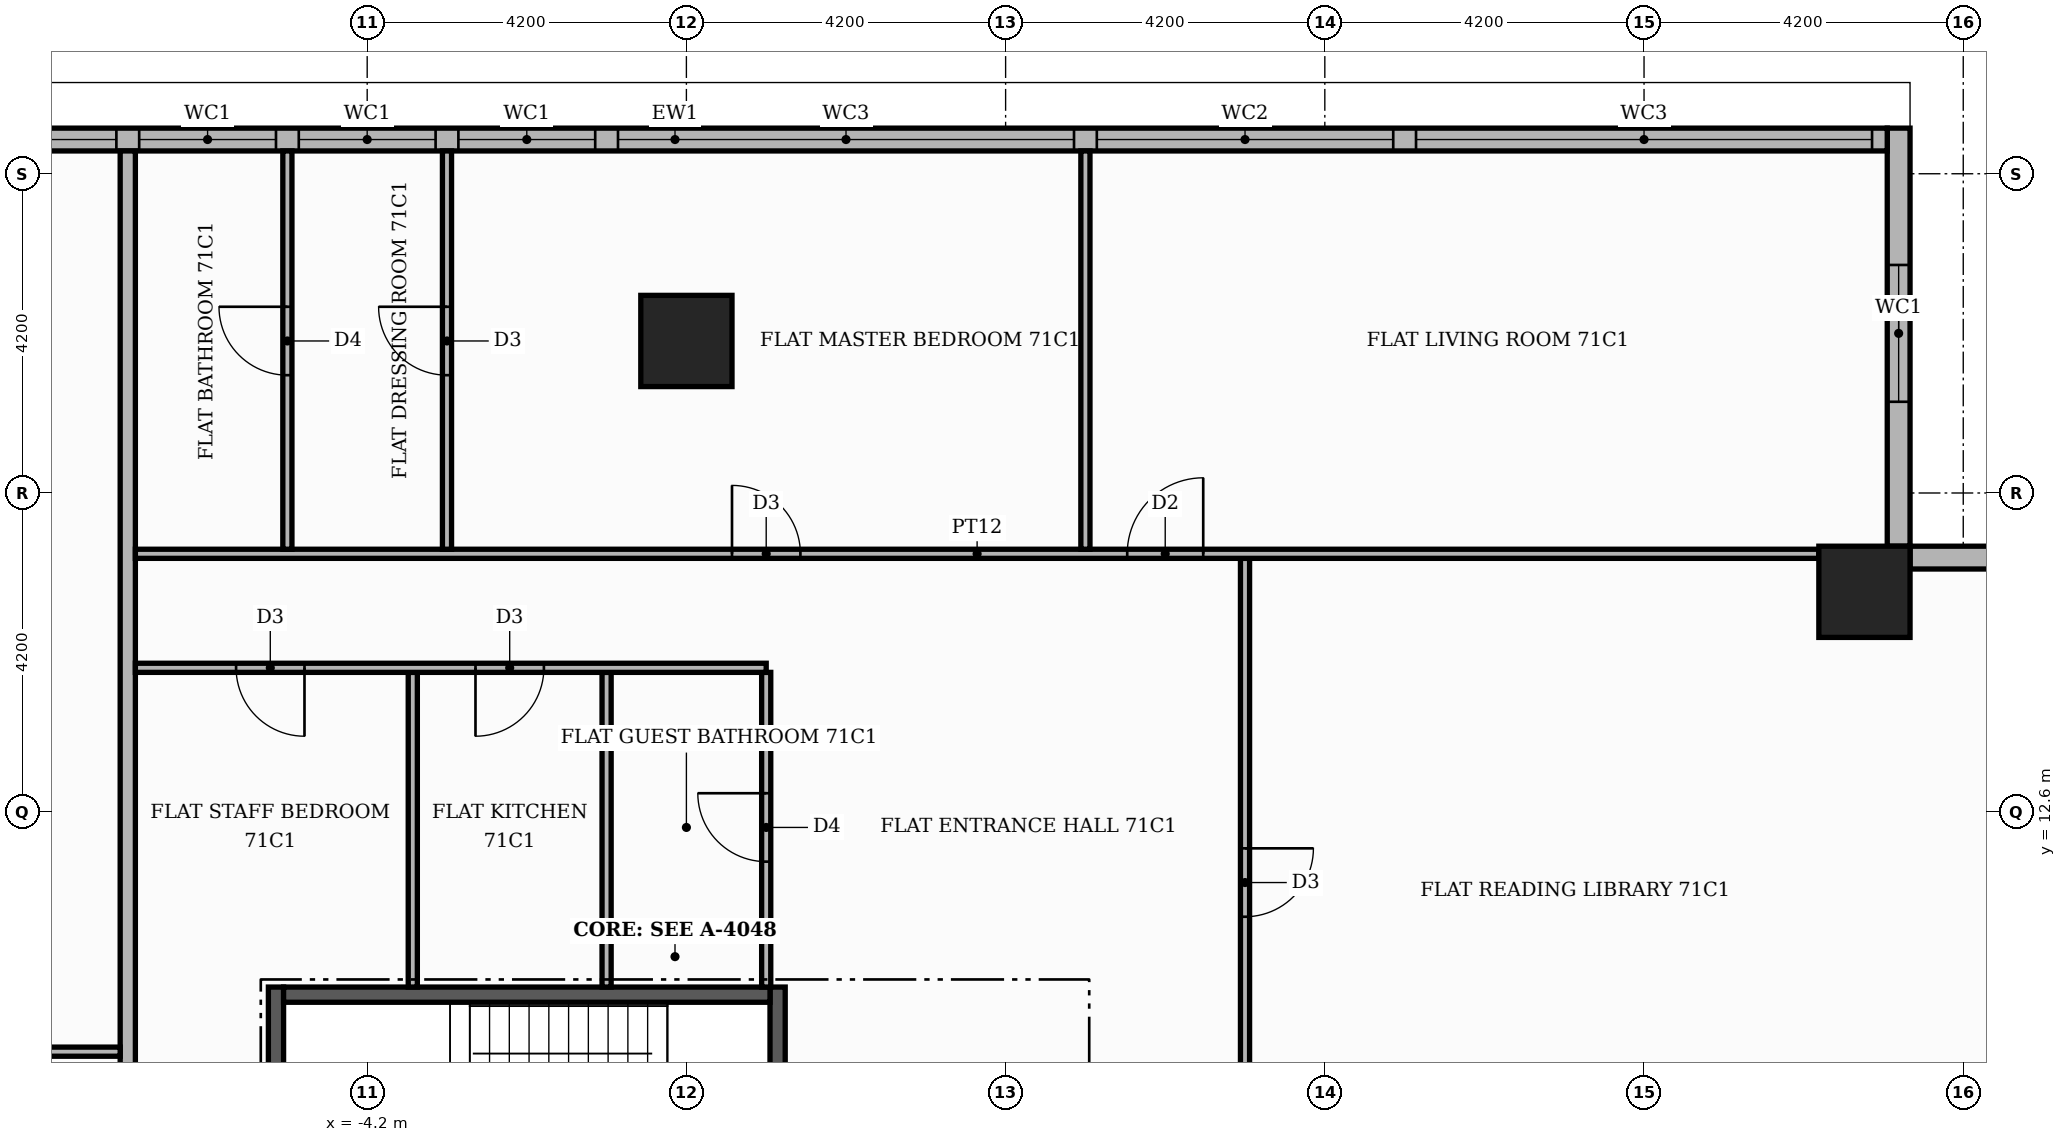
"""IFC4 building model, lengths in metres.
Left out: names, types, materials, properties, quantities, classifications, styles, units other than length and angle.
Written with IfcOpenShell. Run it as: python <this file> out.ifc"""

import sys

from ifc_helpers import new_model, si_unit, direction, frame, frame_2d, origin, origin_2d, place, context, subcontext, project, spatial, rectangle, extrude, element, fill, save


model = new_model("IFC4")
c1 = context("Model", 3, precision=1e-05, world=origin(), true_north=direction((0.0, 1.0)))
c2 = subcontext(c1, "Body", "Model", "MODEL_VIEW")
j1 = project(units=[si_unit("LENGTHUNIT", "METRE"), si_unit("PLANEANGLEUNIT", "RADIAN")], contexts=[c1])
p1 = place(None, origin())
s1 = spatial("IfcSite", under=j1, at=p1, CompositionType="ELEMENT")
p2 = place(p1, origin())
s2 = spatial("IfcBuilding", under=s1, at=p2, CompositionType="ELEMENT")
p3 = place(p2, frame((0.0, 0.0, 296.7)))
s3 = spatial("IfcBuildingStorey", under=s2, at=p3, CompositionType="ELEMENT", Elevation=296.7)
for number, where, z_axis, x_axis in (
    (1, (-5.4, 7.05, 0.0), (0.0, 0.0, 1.0), (0.0, 1.0, 0.0)),
    (2, (1.2, 7.05, 0.0), (0.0, 0.0, 1.0), (0.0, 1.0, 0.0)),
):
    element("IfcWall", number, at=place(p3, frame(where, z_axis=z_axis, x_axis=x_axis)), inside=s3, PredefinedType="SHEAR", context=c2, shape_type="SweptSolid", body=[
        extrude(rectangle(XDim=3.25, YDim=0.2, at=frame_2d((1.625, 0.0))), origin(), (0.0, 0.0, 1.0), 3.55),
    ])
p4 = place(p3, frame((-5.3, 10.2, 0.0), z_axis=(0.0, 0.0, 1.0), x_axis=(1.0, 0.0, 0.0)))
e3 = element("IfcWall", 3, at=p4, inside=s3, PredefinedType="SHEAR", context=c2, shape_type="SweptSolid", body=[
    extrude(rectangle(XDim=6.4, YDim=0.2, at=frame_2d((3.2, 0.0))), origin(), (0.0, 0.0, 1.0), 3.55),
])
for number, where, z_axis, x_axis in (
    (4, (15.5, 15.5, 0.0), (0.0, 0.0, 1.0), (1.0, 0.0, 0.0)),
    (5, (0.0, 18.8, 0.0), (0.0, 0.0, 1.0), (1.0, 0.0, 0.0)),
):
    element("IfcColumn", number, at=place(p3, frame(where, z_axis=z_axis, x_axis=x_axis)), inside=s3, PredefinedType="COLUMN", context=c2, shape_type="SweptSolid", body=[
        extrude(rectangle(XDim=1.2, YDim=1.2, at=origin_2d()), origin(), (0.0, 0.0, 1.0), 3.9),
    ])
p5 = place(p3, frame((21.3, 15.95, 0.0), z_axis=(0.0, 0.0, 1.0), x_axis=(-1.0, 0.0, 0.0)))
e6 = element("IfcWall", 6, at=p5, inside=s3, PredefinedType="STANDARD", context=c2, shape_type="SweptSolid", body=[
    extrude(rectangle(XDim=5.2, YDim=0.3, at=frame_2d((2.6, 0.0))), origin(), (0.0, 0.0, 1.0), 3.55),
])
p6 = place(p5, frame((1.5, 0.0, 0.6)))
e7 = element("IfcOpeningElement", 7, at=p6, cuts=e6, PredefinedType="OPENING", context=c2, shape_type="SweptSolid", body=[
    extrude(rectangle(XDim=1.8, YDim=2.4, at=frame_2d((0.9, 1.2))), frame((0.0, 0.16, 0.0), z_axis=(0.0, -1.0, 0.0), x_axis=(1.0, 0.0, 0.0)), (0.0, 0.0, 1.0), 0.32),
])
p7 = place(p3, frame((15.95, 16.1, 0.0), z_axis=(0.0, 0.0, 1.0), x_axis=(0.0, 1.0, 0.0)))
e8 = element("IfcWall", 8, at=p7, inside=s3, PredefinedType="STANDARD", context=c2, shape_type="SweptSolid", body=[
    extrude(rectangle(XDim=5.5, YDim=0.3, at=frame_2d((2.75, 0.0))), origin(), (0.0, 0.0, 1.0), 3.55),
])
p8 = place(p7, frame((1.9, 0.0, 0.6)))
e9 = element("IfcOpeningElement", 9, at=p8, cuts=e8, PredefinedType="OPENING", context=c2, shape_type="SweptSolid", body=[
    extrude(rectangle(XDim=1.8, YDim=2.4, at=frame_2d((0.9, 1.2))), frame((0.0, 0.16, 0.0), z_axis=(0.0, -1.0, 0.0), x_axis=(1.0, 0.0, 0.0)), (0.0, 0.0, 1.0), 0.32),
])
p9 = place(p3, frame((15.8, 21.45, 0.0), z_axis=(0.0, 0.0, 1.0), x_axis=(-1.0, 0.0, 0.0)))
e10 = element("IfcWall", 10, at=p9, inside=s3, PredefinedType="STANDARD", context=c2, shape_type="SweptSolid", body=[
    extrude(rectangle(XDim=31.9, YDim=0.3, at=frame_2d((15.95, 0.0))), origin(), (0.0, 0.0, 1.0), 3.55),
])
p10 = place(p9, frame((0.2, 0.0, 0.6)))
e11 = element("IfcOpeningElement", 11, at=p10, cuts=e10, PredefinedType="OPENING", context=c2, shape_type="SweptSolid", body=[
    extrude(rectangle(XDim=6.0, YDim=2.4, at=frame_2d((3.0, 1.2))), frame((0.0, 0.16, 0.0), z_axis=(0.0, -1.0, 0.0), x_axis=(1.0, 0.0, 0.0)), (0.0, 0.0, 1.0), 0.32),
])
p11 = place(p9, frame((6.5, 0.0, 0.6)))
e12 = element("IfcOpeningElement", 12, at=p11, cuts=e10, PredefinedType="OPENING", context=c2, shape_type="SweptSolid", body=[
    extrude(rectangle(XDim=3.9, YDim=2.4, at=frame_2d((1.95, 1.2))), frame((0.0, 0.16, 0.0), z_axis=(0.0, -1.0, 0.0), x_axis=(1.0, 0.0, 0.0)), (0.0, 0.0, 1.0), 0.32),
])
p12 = place(p9, frame((10.7, 0.0, 0.6)))
e13 = element("IfcOpeningElement", 13, at=p12, cuts=e10, PredefinedType="OPENING", context=c2, shape_type="SweptSolid", body=[
    extrude(rectangle(XDim=6.0, YDim=2.4, at=frame_2d((3.0, 1.2))), frame((0.0, 0.16, 0.0), z_axis=(0.0, -1.0, 0.0), x_axis=(1.0, 0.0, 0.0)), (0.0, 0.0, 1.0), 0.32),
])
p13 = place(p9, frame((17.0, 0.0, 0.6)))
e14 = element("IfcOpeningElement", 14, at=p13, cuts=e10, PredefinedType="OPENING", context=c2, shape_type="SweptSolid", body=[
    extrude(rectangle(XDim=1.8, YDim=2.4, at=frame_2d((0.9, 1.2))), frame((0.0, 0.16, 0.0), z_axis=(0.0, -1.0, 0.0), x_axis=(1.0, 0.0, 0.0)), (0.0, 0.0, 1.0), 0.32),
])
p14 = place(p9, frame((19.1, 0.0, 0.6)))
e15 = element("IfcOpeningElement", 15, at=p14, cuts=e10, PredefinedType="OPENING", context=c2, shape_type="SweptSolid", body=[
    extrude(rectangle(XDim=1.8, YDim=2.4, at=frame_2d((0.9, 1.2))), frame((0.0, 0.16, 0.0), z_axis=(0.0, -1.0, 0.0), x_axis=(1.0, 0.0, 0.0)), (0.0, 0.0, 1.0), 0.32),
])
p15 = place(p9, frame((21.2, 0.0, 0.6)))
e16 = element("IfcOpeningElement", 16, at=p15, cuts=e10, PredefinedType="OPENING", context=c2, shape_type="SweptSolid", body=[
    extrude(rectangle(XDim=1.8, YDim=2.4, at=frame_2d((0.9, 1.2))), frame((0.0, 0.16, 0.0), z_axis=(0.0, -1.0, 0.0), x_axis=(1.0, 0.0, 0.0)), (0.0, 0.0, 1.0), 0.32),
])
p16 = place(p9, frame((23.3, 0.0, 0.6)))
e17 = element("IfcOpeningElement", 17, at=p16, cuts=e10, PredefinedType="OPENING", context=c2, shape_type="SweptSolid", body=[
    extrude(rectangle(XDim=6.0, YDim=2.4, at=frame_2d((3.0, 1.2))), frame((0.0, 0.16, 0.0), z_axis=(0.0, -1.0, 0.0), x_axis=(1.0, 0.0, 0.0)), (0.0, 0.0, 1.0), 0.32),
])
p17 = place(p9, frame((29.6, 0.0, 0.6)))
e18 = element("IfcOpeningElement", 18, at=p17, cuts=e10, PredefinedType="OPENING", context=c2, shape_type="SweptSolid", body=[
    extrude(rectangle(XDim=1.8, YDim=2.4, at=frame_2d((0.9, 1.2))), frame((0.0, 0.16, 0.0), z_axis=(0.0, -1.0, 0.0), x_axis=(1.0, 0.0, 0.0)), (0.0, 0.0, 1.0), 0.32),
])
p18 = place(p3, frame((-7.35, 7.45, 0.0), z_axis=(0.0, 0.0, 1.0), x_axis=(0.0, 1.0, 0.0)))
e19 = element("IfcWall", 19, at=p18, inside=s3, PredefinedType="PARTITIONING", context=c2, shape_type="SweptSolid", body=[
    extrude(rectangle(XDim=13.85, YDim=0.2, at=frame_2d((6.925, 0.0))), origin(), (0.0, 0.0, 1.0), 3.55),
])
p19 = place(p3, frame((7.35, 7.45, 0.0), z_axis=(0.0, 0.0, 1.0), x_axis=(0.0, 1.0, 0.0)))
e20 = element("IfcWall", 20, at=p19, inside=s3, PredefinedType="PARTITIONING", context=c2, shape_type="SweptSolid", body=[
    extrude(rectangle(XDim=8.49, YDim=0.12, at=frame_2d((4.245, 0.0))), origin(), (0.0, 0.0, 1.0), 3.55),
])
p20 = place(p19, frame((3.775, 0.0, 0.0)))
e21 = element("IfcOpeningElement", 21, at=p20, cuts=e20, PredefinedType="OPENING", context=c2, shape_type="SweptSolid", body=[
    extrude(rectangle(XDim=0.9, YDim=2.1, at=frame_2d((0.45, 1.05))), frame((0.0, 0.07, 0.0), z_axis=(0.0, -1.0, 0.0), x_axis=(1.0, 0.0, 0.0)), (0.0, 0.0, 1.0), 0.14),
])
p21 = place(p3, frame((-16.0, 9.45, 0.0), z_axis=(0.0, 0.0, 1.0), x_axis=(1.0, 0.0, 0.0)))
e22 = element("IfcWall", 22, at=p21, inside=s3, PredefinedType="PARTITIONING", context=c2, shape_type="SweptSolid", body=[
    extrude(rectangle(XDim=8.55, YDim=0.12, at=frame_2d((4.275, 0.0))), origin(), (0.0, 0.0, 1.0), 3.55),
])
p22 = place(p21, frame((3.875, 0.0, 0.0)))
e23 = element("IfcOpeningElement", 23, at=p22, cuts=e22, PredefinedType="OPENING", context=c2, shape_type="SweptSolid", body=[
    extrude(rectangle(XDim=0.9, YDim=2.1, at=frame_2d((0.45, 1.05))), frame((0.0, 0.07, 0.0), z_axis=(0.0, -1.0, 0.0), x_axis=(1.0, 0.0, 0.0)), (0.0, 0.0, 1.0), 0.14),
])
for number, where, z_axis, x_axis in (
    (24, (-3.6, 10.3, 0.0), (0.0, 0.0, 1.0), (0.0, 1.0, 0.0)),
    (25, (-1.05, 10.3, 0.0), (0.0, 0.0, 1.0), (0.0, 1.0, 0.0)),
):
    element("IfcWall", number, at=place(p3, frame(where, z_axis=z_axis, x_axis=x_axis)), inside=s3, PredefinedType="PARTITIONING", context=c2, shape_type="SweptSolid", body=[
        extrude(rectangle(XDim=4.14, YDim=0.12, at=frame_2d((2.07, 0.0))), origin(), (0.0, 0.0, 1.0), 3.55),
    ])
p23 = place(p3, frame((1.05, 10.3, 0.0), z_axis=(0.0, 0.0, 1.0), x_axis=(0.0, 1.0, 0.0)))
e26 = element("IfcWall", 26, at=p23, inside=s3, PredefinedType="PARTITIONING", context=c2, shape_type="SweptSolid", body=[
    extrude(rectangle(XDim=4.14, YDim=0.12, at=frame_2d((2.07, 0.0))), origin(), (0.0, 0.0, 1.0), 3.55),
])
p24 = place(p23, frame((1.65, 0.0, 0.0)))
e27 = element("IfcOpeningElement", 27, at=p24, cuts=e26, PredefinedType="OPENING", context=c2, shape_type="SweptSolid", body=[
    extrude(rectangle(XDim=0.9, YDim=2.1, at=frame_2d((0.45, 1.05))), frame((0.0, 0.07, 0.0), z_axis=(0.0, -1.0, 0.0), x_axis=(1.0, 0.0, 0.0)), (0.0, 0.0, 1.0), 0.14),
])
p25 = place(p3, frame((-7.25, 14.5, 0.0), z_axis=(0.0, 0.0, 1.0), x_axis=(1.0, 0.0, 0.0)))
e28 = element("IfcWall", 28, at=p25, inside=s3, PredefinedType="PARTITIONING", context=c2, shape_type="SweptSolid", body=[
    extrude(rectangle(XDim=8.3, YDim=0.12, at=frame_2d((4.15, 0.0))), origin(), (0.0, 0.0, 1.0), 3.55),
])
p26 = place(p25, frame((4.475, 0.0, 0.0)))
e29 = element("IfcOpeningElement", 29, at=p26, cuts=e28, PredefinedType="OPENING", context=c2, shape_type="SweptSolid", body=[
    extrude(rectangle(XDim=0.9, YDim=2.1, at=frame_2d((0.45, 1.05))), frame((0.0, 0.07, 0.0), z_axis=(0.0, -1.0, 0.0), x_axis=(1.0, 0.0, 0.0)), (0.0, 0.0, 1.0), 0.14),
])
p27 = place(p25, frame((1.325, 0.0, 0.0)))
e30 = element("IfcOpeningElement", 30, at=p27, cuts=e28, PredefinedType="OPENING", context=c2, shape_type="SweptSolid", body=[
    extrude(rectangle(XDim=0.9, YDim=2.1, at=frame_2d((0.45, 1.05))), frame((0.0, 0.07, 0.0), z_axis=(0.0, -1.0, 0.0), x_axis=(1.0, 0.0, 0.0)), (0.0, 0.0, 1.0), 0.14),
])
p28 = place(p3, frame((-7.25, 16.0, 0.0), z_axis=(0.0, 0.0, 1.0), x_axis=(1.0, 0.0, 0.0)))
e31 = element("IfcWall", 31, at=p28, inside=s3, PredefinedType="PARTITIONING", context=c2, shape_type="SweptSolid", body=[
    extrude(rectangle(XDim=22.15, YDim=0.12, at=frame_2d((11.075, 0.0))), origin(), (0.0, 0.0, 1.0), 3.55),
])
p29 = place(p28, frame((13.05, 0.0, 0.0)))
e32 = element("IfcOpeningElement", 32, at=p29, cuts=e31, PredefinedType="OPENING", context=c2, shape_type="SweptSolid", body=[
    extrude(rectangle(XDim=1.0, YDim=2.1, at=frame_2d((0.5, 1.05))), frame((0.0, 0.07, 0.0), z_axis=(0.0, -1.0, 0.0), x_axis=(1.0, 0.0, 0.0)), (0.0, 0.0, 1.0), 0.14),
])
p30 = place(p28, frame((7.85, 0.0, 0.0)))
e33 = element("IfcOpeningElement", 33, at=p30, cuts=e31, PredefinedType="OPENING", context=c2, shape_type="SweptSolid", body=[
    extrude(rectangle(XDim=0.9, YDim=2.1, at=frame_2d((0.45, 1.05))), frame((0.0, 0.07, 0.0), z_axis=(0.0, -1.0, 0.0), x_axis=(1.0, 0.0, 0.0)), (0.0, 0.0, 1.0), 0.14),
])
p31 = place(p3, frame((-5.25, 16.06, 0.0), z_axis=(0.0, 0.0, 1.0), x_axis=(0.0, 1.0, 0.0)))
e34 = element("IfcWall", 34, at=p31, inside=s3, PredefinedType="PARTITIONING", context=c2, shape_type="SweptSolid", body=[
    extrude(rectangle(XDim=5.24, YDim=0.12, at=frame_2d((2.62, 0.0))), origin(), (0.0, 0.0, 1.0), 3.55),
])
p32 = place(p31, frame((2.29, 0.0, 0.0)))
e35 = element("IfcOpeningElement", 35, at=p32, cuts=e34, PredefinedType="OPENING", context=c2, shape_type="SweptSolid", body=[
    extrude(rectangle(XDim=0.9, YDim=2.1, at=frame_2d((0.45, 1.05))), frame((0.0, 0.07, 0.0), z_axis=(0.0, -1.0, 0.0), x_axis=(1.0, 0.0, 0.0)), (0.0, 0.0, 1.0), 0.14),
])
p33 = place(p3, frame((-3.15, 16.06, 0.0), z_axis=(0.0, 0.0, 1.0), x_axis=(0.0, 1.0, 0.0)))
e36 = element("IfcWall", 36, at=p33, inside=s3, PredefinedType="PARTITIONING", context=c2, shape_type="SweptSolid", body=[
    extrude(rectangle(XDim=5.24, YDim=0.12, at=frame_2d((2.62, 0.0))), origin(), (0.0, 0.0, 1.0), 3.55),
])
p34 = place(p33, frame((2.29, 0.0, 0.0)))
e37 = element("IfcOpeningElement", 37, at=p34, cuts=e36, PredefinedType="OPENING", context=c2, shape_type="SweptSolid", body=[
    extrude(rectangle(XDim=0.9, YDim=2.1, at=frame_2d((0.45, 1.05))), frame((0.0, 0.07, 0.0), z_axis=(0.0, -1.0, 0.0), x_axis=(1.0, 0.0, 0.0)), (0.0, 0.0, 1.0), 0.14),
])
p35 = place(p3, frame((5.25, 16.06, 0.0), z_axis=(0.0, 0.0, 1.0), x_axis=(0.0, 1.0, 0.0)))
e38 = element("IfcWall", 38, at=p35, inside=s3, PredefinedType="PARTITIONING", context=c2, shape_type="SweptSolid", body=[
    extrude(rectangle(XDim=5.24, YDim=0.12, at=frame_2d((2.62, 0.0))), origin(), (0.0, 0.0, 1.0), 3.55),
])
p36 = place(p8, origin())
e39 = element("IfcWindow", 39, at=p36, inside=s3, PartitioningType="SINGLE_PANEL", PredefinedType="WINDOW", context=c2, shape_type="SweptSolid", body=[
    extrude(rectangle(XDim=1.8, YDim=2.4, at=frame_2d((0.9, 1.2))), frame((0.0, 0.03, 0.0), z_axis=(0.0, -1.0, 0.0), x_axis=(1.0, 0.0, 0.0)), (0.0, 0.0, 1.0), 0.06),
])
fill(e9, e39)
p37 = place(p10, origin())
e40 = element("IfcWindow", 40, at=p37, inside=s3, PartitioningType="SINGLE_PANEL", PredefinedType="WINDOW", context=c2, shape_type="SweptSolid", body=[
    extrude(rectangle(XDim=6.0, YDim=2.4, at=frame_2d((3.0, 1.2))), frame((0.0, 0.03, 0.0), z_axis=(0.0, -1.0, 0.0), x_axis=(1.0, 0.0, 0.0)), (0.0, 0.0, 1.0), 0.06),
])
fill(e11, e40)
p38 = place(p11, origin())
e41 = element("IfcWindow", 41, at=p38, inside=s3, PartitioningType="SINGLE_PANEL", PredefinedType="WINDOW", context=c2, shape_type="SweptSolid", body=[
    extrude(rectangle(XDim=3.9, YDim=2.4, at=frame_2d((1.95, 1.2))), frame((0.0, 0.03, 0.0), z_axis=(0.0, -1.0, 0.0), x_axis=(1.0, 0.0, 0.0)), (0.0, 0.0, 1.0), 0.06),
])
fill(e12, e41)
p39 = place(p12, origin())
e42 = element("IfcWindow", 42, at=p39, inside=s3, PartitioningType="SINGLE_PANEL", PredefinedType="WINDOW", context=c2, shape_type="SweptSolid", body=[
    extrude(rectangle(XDim=6.0, YDim=2.4, at=frame_2d((3.0, 1.2))), frame((0.0, 0.03, 0.0), z_axis=(0.0, -1.0, 0.0), x_axis=(1.0, 0.0, 0.0)), (0.0, 0.0, 1.0), 0.06),
])
fill(e13, e42)
p40 = place(p13, origin())
e43 = element("IfcWindow", 43, at=p40, inside=s3, PartitioningType="SINGLE_PANEL", PredefinedType="WINDOW", context=c2, shape_type="SweptSolid", body=[
    extrude(rectangle(XDim=1.8, YDim=2.4, at=frame_2d((0.9, 1.2))), frame((0.0, 0.03, 0.0), z_axis=(0.0, -1.0, 0.0), x_axis=(1.0, 0.0, 0.0)), (0.0, 0.0, 1.0), 0.06),
])
fill(e14, e43)
p41 = place(p14, origin())
e44 = element("IfcWindow", 44, at=p41, inside=s3, PartitioningType="SINGLE_PANEL", PredefinedType="WINDOW", context=c2, shape_type="SweptSolid", body=[
    extrude(rectangle(XDim=1.8, YDim=2.4, at=frame_2d((0.9, 1.2))), frame((0.0, 0.03, 0.0), z_axis=(0.0, -1.0, 0.0), x_axis=(1.0, 0.0, 0.0)), (0.0, 0.0, 1.0), 0.06),
])
fill(e15, e44)
p42 = place(p15, origin())
e45 = element("IfcWindow", 45, at=p42, inside=s3, PartitioningType="SINGLE_PANEL", PredefinedType="WINDOW", context=c2, shape_type="SweptSolid", body=[
    extrude(rectangle(XDim=1.8, YDim=2.4, at=frame_2d((0.9, 1.2))), frame((0.0, 0.03, 0.0), z_axis=(0.0, -1.0, 0.0), x_axis=(1.0, 0.0, 0.0)), (0.0, 0.0, 1.0), 0.06),
])
fill(e16, e45)
p43 = place(p16, origin())
e46 = element("IfcWindow", 46, at=p43, inside=s3, PartitioningType="SINGLE_PANEL", PredefinedType="WINDOW", context=c2, shape_type="SweptSolid", body=[
    extrude(rectangle(XDim=6.0, YDim=2.4, at=frame_2d((3.0, 1.2))), frame((0.0, 0.03, 0.0), z_axis=(0.0, -1.0, 0.0), x_axis=(1.0, 0.0, 0.0)), (0.0, 0.0, 1.0), 0.06),
])
fill(e17, e46)
p44 = place(p20, frame((0.9, 0.0, 0.0), z_axis=(0.0, 0.0, 1.0), x_axis=(-1.0, 0.0, 0.0)))
e47 = element("IfcDoor", 47, at=p44, inside=s3, OperationType="SINGLE_SWING_RIGHT", PredefinedType="DOOR", context=c2, shape_type="SweptSolid", body=[
    extrude(rectangle(XDim=0.9, YDim=2.1, at=frame_2d((0.45, 1.05))), frame((0.0, 0.025, 0.0), z_axis=(0.0, -1.0, 0.0), x_axis=(1.0, 0.0, 0.0)), (0.0, 0.0, 1.0), 0.05),
])
fill(e21, e47)
p45 = place(p24, origin())
e48 = element("IfcDoor", 48, at=p45, inside=s3, OperationType="SINGLE_SWING_RIGHT", PredefinedType="DOOR", context=c2, shape_type="SweptSolid", body=[
    extrude(rectangle(XDim=0.9, YDim=2.1, at=frame_2d((0.45, 1.05))), frame((0.0, 0.025, 0.0), z_axis=(0.0, -1.0, 0.0), x_axis=(1.0, 0.0, 0.0)), (0.0, 0.0, 1.0), 0.05),
])
fill(e27, e48)
p46 = place(p26, frame((0.9, 0.0, 0.0), z_axis=(0.0, 0.0, 1.0), x_axis=(-1.0, 0.0, 0.0)))
e49 = element("IfcDoor", 49, at=p46, inside=s3, OperationType="SINGLE_SWING_LEFT", PredefinedType="DOOR", context=c2, shape_type="SweptSolid", body=[
    extrude(rectangle(XDim=0.9, YDim=2.1, at=frame_2d((0.45, 1.05))), frame((0.0, 0.025, 0.0), z_axis=(0.0, -1.0, 0.0), x_axis=(1.0, 0.0, 0.0)), (0.0, 0.0, 1.0), 0.05),
])
fill(e29, e49)
p47 = place(p27, frame((0.9, 0.0, 0.0), z_axis=(0.0, 0.0, 1.0), x_axis=(-1.0, 0.0, 0.0)))
e50 = element("IfcDoor", 50, at=p47, inside=s3, OperationType="SINGLE_SWING_RIGHT", PredefinedType="DOOR", context=c2, shape_type="SweptSolid", body=[
    extrude(rectangle(XDim=0.9, YDim=2.1, at=frame_2d((0.45, 1.05))), frame((0.0, 0.025, 0.0), z_axis=(0.0, -1.0, 0.0), x_axis=(1.0, 0.0, 0.0)), (0.0, 0.0, 1.0), 0.05),
])
fill(e30, e50)
p48 = place(p29, origin())
e51 = element("IfcDoor", 51, at=p48, inside=s3, OperationType="SINGLE_SWING_RIGHT", PredefinedType="DOOR", context=c2, shape_type="SweptSolid", body=[
    extrude(rectangle(XDim=1.0, YDim=2.1, at=frame_2d((0.5, 1.05))), frame((0.0, 0.025, 0.0), z_axis=(0.0, -1.0, 0.0), x_axis=(1.0, 0.0, 0.0)), (0.0, 0.0, 1.0), 0.05),
])
fill(e32, e51)
p49 = place(p30, origin())
e52 = element("IfcDoor", 52, at=p49, inside=s3, OperationType="SINGLE_SWING_LEFT", PredefinedType="DOOR", context=c2, shape_type="SweptSolid", body=[
    extrude(rectangle(XDim=0.9, YDim=2.1, at=frame_2d((0.45, 1.05))), frame((0.0, 0.025, 0.0), z_axis=(0.0, -1.0, 0.0), x_axis=(1.0, 0.0, 0.0)), (0.0, 0.0, 1.0), 0.05),
])
fill(e33, e52)
p50 = place(p34, origin())
e53 = element("IfcDoor", 53, at=p50, inside=s3, OperationType="SINGLE_SWING_RIGHT", PredefinedType="DOOR", context=c2, shape_type="SweptSolid", body=[
    extrude(rectangle(XDim=0.9, YDim=2.1, at=frame_2d((0.45, 1.05))), frame((0.0, 0.025, 0.0), z_axis=(0.0, -1.0, 0.0), x_axis=(1.0, 0.0, 0.0)), (0.0, 0.0, 1.0), 0.05),
])
fill(e37, e53)
p51 = place(p32, origin())
e54 = element("IfcDoor", 54, at=p51, inside=s3, OperationType="SINGLE_SWING_RIGHT", PredefinedType="DOOR", context=c2, shape_type="SweptSolid", body=[
    extrude(rectangle(XDim=0.9, YDim=2.1, at=frame_2d((0.45, 1.05))), frame((0.0, 0.025, 0.0), z_axis=(0.0, -1.0, 0.0), x_axis=(1.0, 0.0, 0.0)), (0.0, 0.0, 1.0), 0.05),
])
fill(e35, e54)
save(model, sys.argv[1])
